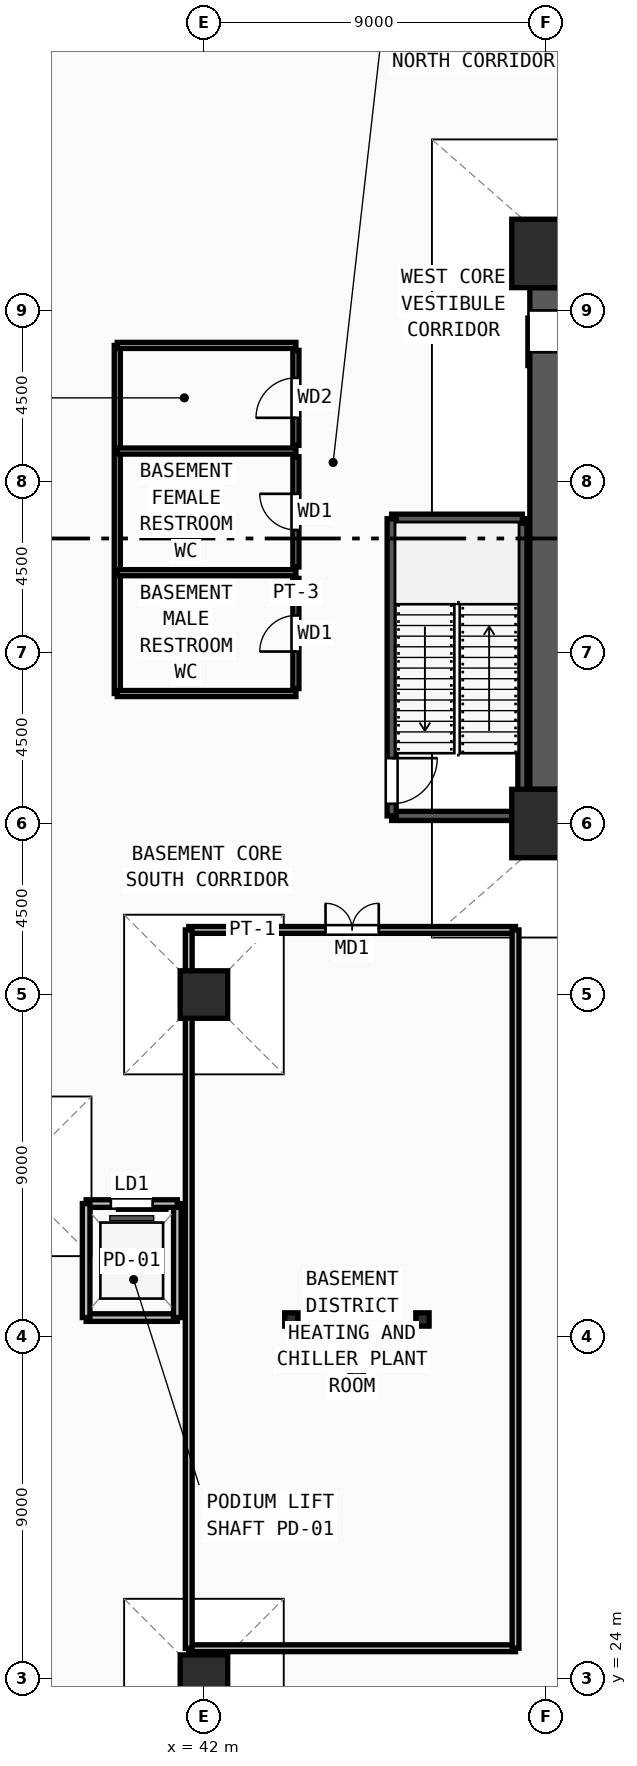
"""IFC4 building model, lengths in metres.
Left out: names, types, materials, properties, quantities, classifications, styles, units other than length and angle.
Written with IfcOpenShell. Run it as: python <this file> out.ifc"""

import sys

from ifc_helpers import new_model, si_unit, direction, frame, frame_2d, origin, origin_2d, place, context, subcontext, project, spatial, rectangle, i_section, extrude, source, transform, mapped, element, fill, save


model = new_model("IFC4")
c1 = context("Model", 3, precision=1e-05, world=origin(), true_north=direction((0.0, 1.0)))
c2 = subcontext(c1, "Body", "Model", "MODEL_VIEW")
j1 = project(units=[si_unit("LENGTHUNIT", "METRE"), si_unit("PLANEANGLEUNIT", "RADIAN")], contexts=[c1])
p1 = place(None, origin())
s1 = spatial("IfcSite", under=j1, at=p1, CompositionType="ELEMENT")
p2 = place(p1, origin())
s2 = spatial("IfcBuilding", under=s1, at=p2, CompositionType="ELEMENT")
p3 = place(p2, frame((0.0, 0.0, -9.6)))
s3 = spatial("IfcBuildingStorey", under=s2, at=p3, CompositionType="ELEMENT", Elevation=-9.6)
m1 = source(origin(), c2, "Body", "SweptSolid", [
    extrude(rectangle(XDim=1.8, YDim=1.8, at=origin_2d()), origin(), (0.0, 0.0, 1.0), 4.8),
])
for number, where, z_axis, x_axis in (
    (1, (51.0, 46.5, 0.0), (0.0, 0.0, 1.0), (1.0, 0.0, 0.0)),
    (2, (51.0, 61.5, 0.0), (0.0, 0.0, 1.0), (1.0, 0.0, 0.0)),
):
    element("IfcColumn", number, at=place(p3, frame(where, z_axis=z_axis, x_axis=x_axis)), inside=s3, PredefinedType="COLUMN", context=c2, shape_type="MappedRepresentation", body=[
        mapped(m1, transform((0.0, 0.0, 0.0), x_axis=(1.0, 0.0, 0.0), y_axis=(0.0, 1.0, 0.0), z_axis=(0.0, 0.0, 1.0), scale=1.0)),
    ])
m2 = source(origin(), c2, "Body", "SweptSolid", [
    extrude(rectangle(XDim=1.25, YDim=1.25, at=origin_2d()), origin(), (0.0, 0.0, 1.0), 4.8),
])
for number, where, z_axis, x_axis in (
    (3, (42.0, 24.0, 0.0), (0.0, 0.0, 1.0), (1.0, 0.0, 0.0)),
    (4, (42.0, 42.0, 0.0), (0.0, 0.0, 1.0), (1.0, 0.0, 0.0)),
):
    element("IfcColumn", number, at=place(p3, frame(where, z_axis=z_axis, x_axis=x_axis)), inside=s3, PredefinedType="COLUMN", context=c2, shape_type="MappedRepresentation", body=[
        mapped(m2, transform((0.0, 0.0, 0.0), x_axis=(1.0, 0.0, 0.0), y_axis=(0.0, 1.0, 0.0), z_axis=(0.0, 0.0, 1.0), scale=1.0)),
    ])
m3 = source(origin(), c2, "Body", "SweptSolid", [
    extrude(i_section(OverallWidth=0.35, OverallDepth=0.35, WebThickness=0.012, FlangeThickness=0.019, at=origin_2d()), origin(), (0.0, 0.0, 1.0), 4.8),
])
for number, where, z_axis, x_axis in (
    (5, (44.3, 33.45, 0.0), (0.0, 0.0, 1.0), (1.0, 0.0, 0.0)),
    (6, (47.75, 33.45, 0.0), (0.0, 0.0, 1.0), (1.0, 0.0, 0.0)),
    (7, (46.02, 32.05, 0.0), (0.0, 0.0, 1.0), (1.0, 0.0, 0.0)),
):
    element("IfcColumn", number, at=place(p3, frame(where, z_axis=z_axis, x_axis=x_axis)), inside=s3, PredefinedType="COLUMN", context=c2, shape_type="MappedRepresentation", body=[
        mapped(m3, transform((0.0, 0.0, 0.0), x_axis=(1.0, 0.0, 0.0), y_axis=(0.0, 1.0, 0.0), z_axis=(0.0, 0.0, 1.0), scale=1.0)),
    ])
p4 = place(p3, frame((51.0, 47.4, 0.0), z_axis=(0.0, 0.0, 1.0), x_axis=(0.0, 1.0, 0.0)))
e8 = element("IfcWall", 8, at=p4, inside=s3, PredefinedType="SHEAR", context=c2, shape_type="SweptSolid", body=[
    extrude(rectangle(XDim=13.2, YDim=0.85, at=frame_2d((6.6, 0.0))), origin(), (0.0, 0.0, 1.0), 4.5),
])
m4 = source(origin(), c2, "Body", "SweptSolid", [
    extrude(rectangle(XDim=1.1, YDim=2.2, at=frame_2d((0.55, 1.1))), frame((0.0, 0.435, 0.0), z_axis=(0.0, -1.0, 0.0), x_axis=(1.0, 0.0, 0.0)), (0.0, 0.0, 1.0), 0.87),
])
p5 = place(p4, frame((11.5, 0.0, 0.0)))
e9 = element("IfcOpeningElement", 9, at=p5, cuts=e8, PredefinedType="OPENING", context=c2, shape_type="MappedRepresentation", body=[
    mapped(m4, transform((0.0, 0.0, 0.0), x_axis=(1.0, 0.0, 0.0), y_axis=(0.0, 1.0, 0.0), z_axis=(0.0, 0.0, 1.0), scale=1.0)),
])
p6 = place(p3, frame((46.94, 46.7, 0.0), z_axis=(0.0, 0.0, 1.0), x_axis=(1.0, 0.0, 0.0)))
e10 = element("IfcWall", 10, at=p6, inside=s3, PredefinedType="SOLIDWALL", context=c2, shape_type="SweptSolid", body=[
    extrude(rectangle(XDim=3.44, YDim=0.24, at=frame_2d((1.72, 0.0))), origin(), (0.0, 0.0, 1.0), 4.5),
])
p7 = place(p3, frame((50.38, 46.7, 0.0), z_axis=(0.0, 0.0, 1.0), x_axis=(0.0, 1.0, 0.0)))
e11 = element("IfcWall", 11, at=p7, inside=s3, PredefinedType="SOLIDWALL", context=c2, shape_type="SweptSolid", body=[
    extrude(rectangle(XDim=7.82, YDim=0.24, at=frame_2d((3.91, 0.0))), origin(), (0.0, 0.0, 1.0), 4.5),
])
p8 = place(p3, frame((50.38, 54.52, 0.0), z_axis=(0.0, 0.0, 1.0), x_axis=(-1.0, 0.0, 0.0)))
e12 = element("IfcWall", 12, at=p8, inside=s3, PredefinedType="SOLIDWALL", context=c2, shape_type="SweptSolid", body=[
    extrude(rectangle(XDim=3.44, YDim=0.24, at=frame_2d((1.72, 0.0))), origin(), (0.0, 0.0, 1.0), 4.5),
])
p9 = place(p3, frame((46.94, 54.52, 0.0), z_axis=(0.0, 0.0, 1.0), x_axis=(0.0, -1.0, 0.0)))
e13 = element("IfcWall", 13, at=p9, inside=s3, PredefinedType="SOLIDWALL", context=c2, shape_type="SweptSolid", body=[
    extrude(rectangle(XDim=7.82, YDim=0.24, at=frame_2d((3.91, 0.0))), origin(), (0.0, 0.0, 1.0), 4.5),
])
m5 = source(origin(), c2, "Body", "SweptSolid", [
    extrude(rectangle(XDim=1.2, YDim=2.2, at=frame_2d((0.6, 1.1))), frame((0.0, 0.13, 0.0), z_axis=(0.0, -1.0, 0.0), x_axis=(1.0, 0.0, 0.0)), (0.0, 0.0, 1.0), 0.26),
])
p10 = place(p9, frame((6.3, 0.0, 0.0)))
e14 = element("IfcOpeningElement", 14, at=p10, cuts=e13, PredefinedType="OPENING", context=c2, shape_type="MappedRepresentation", body=[
    mapped(m5, transform((0.0, 0.0, 0.0), x_axis=(1.0, 0.0, 0.0), y_axis=(0.0, 1.0, 0.0), z_axis=(0.0, 0.0, 1.0), scale=1.0)),
])
p11 = place(p3, frame((38.9, 33.5, 0.0), z_axis=(0.0, 0.0, 1.0), x_axis=(1.0, 0.0, 0.0)))
e15 = element("IfcWall", 15, at=p11, inside=s3, PredefinedType="SOLIDWALL", context=c2, shape_type="SweptSolid", body=[
    extrude(rectangle(XDim=2.4, YDim=0.2, at=frame_2d((1.2, 0.0))), origin(), (0.0, 0.0, 1.0), 4.5),
])
p12 = place(p3, frame((41.3, 33.5, 0.0), z_axis=(0.0, 0.0, 1.0), x_axis=(0.0, 1.0, 0.0)))
e16 = element("IfcWall", 16, at=p12, inside=s3, PredefinedType="SOLIDWALL", context=c2, shape_type="SweptSolid", body=[
    extrude(rectangle(XDim=3.0, YDim=0.2, at=frame_2d((1.5, 0.0))), origin(), (0.0, 0.0, 1.0), 4.5),
])
p13 = place(p3, frame((41.3, 36.5, 0.0), z_axis=(0.0, 0.0, 1.0), x_axis=(-1.0, 0.0, 0.0)))
e17 = element("IfcWall", 17, at=p13, inside=s3, PredefinedType="SOLIDWALL", context=c2, shape_type="SweptSolid", body=[
    extrude(rectangle(XDim=2.4, YDim=0.2, at=frame_2d((1.2, 0.0))), origin(), (0.0, 0.0, 1.0), 4.5),
])
m6 = source(origin(), c2, "Body", "SweptSolid", [
    extrude(rectangle(XDim=1.1, YDim=2.2, at=frame_2d((0.55, 1.1))), frame((0.0, 0.11, 0.0), z_axis=(0.0, -1.0, 0.0), x_axis=(1.0, 0.0, 0.0)), (0.0, 0.0, 1.0), 0.22),
])
p14 = place(p13, frame((0.65, 0.0, 0.0)))
e18 = element("IfcOpeningElement", 18, at=p14, cuts=e17, PredefinedType="OPENING", context=c2, shape_type="MappedRepresentation", body=[
    mapped(m6, transform((0.0, 0.0, 0.0), x_axis=(1.0, 0.0, 0.0), y_axis=(0.0, 1.0, 0.0), z_axis=(0.0, 0.0, 1.0), scale=1.0)),
])
p15 = place(p3, frame((38.9, 36.5, 0.0), z_axis=(0.0, 0.0, 1.0), x_axis=(0.0, -1.0, 0.0)))
e19 = element("IfcWall", 19, at=p15, inside=s3, PredefinedType="SOLIDWALL", context=c2, shape_type="SweptSolid", body=[
    extrude(rectangle(XDim=3.0, YDim=0.2, at=frame_2d((1.5, 0.0))), origin(), (0.0, 0.0, 1.0), 4.5),
])
p16 = place(p3, frame((44.42, 50.05, 0.0), z_axis=(0.0, 0.0, 1.0), x_axis=(0.0, 1.0, 0.0)))
e20 = element("IfcWall", 20, at=p16, inside=s3, PredefinedType="PARTITIONING", context=c2, shape_type="SweptSolid", body=[
    extrude(rectangle(XDim=2.9, YDim=0.16, at=frame_2d((1.45, 0.0))), origin(), (0.0, 0.0, 1.0), 4.5),
])
m7 = source(origin(), c2, "Body", "SweptSolid", [
    extrude(rectangle(XDim=0.95, YDim=2.15, at=frame_2d((0.475, 1.075))), frame((0.0, 0.09, 0.0), z_axis=(0.0, -1.0, 0.0), x_axis=(1.0, 0.0, 0.0)), (0.0, 0.0, 1.0), 0.18),
])
p17 = place(p16, frame((0.975, 0.0, 0.0)))
e21 = element("IfcOpeningElement", 21, at=p17, cuts=e20, PredefinedType="OPENING", context=c2, shape_type="MappedRepresentation", body=[
    mapped(m7, transform((0.0, 0.0, 0.0), x_axis=(1.0, 0.0, 0.0), y_axis=(0.0, 1.0, 0.0), z_axis=(0.0, 0.0, 1.0), scale=1.0)),
])
p18 = place(p3, frame((44.42, 53.25, 0.0), z_axis=(0.0, 0.0, 1.0), x_axis=(0.0, 1.0, 0.0)))
e22 = element("IfcWall", 22, at=p18, inside=s3, PredefinedType="PARTITIONING", context=c2, shape_type="SweptSolid", body=[
    extrude(rectangle(XDim=2.9, YDim=0.16, at=frame_2d((1.45, 0.0))), origin(), (0.0, 0.0, 1.0), 4.5),
])
p19 = place(p18, frame((0.975, 0.0, 0.0)))
e23 = element("IfcOpeningElement", 23, at=p19, cuts=e22, PredefinedType="OPENING", context=c2, shape_type="MappedRepresentation", body=[
    mapped(m7, transform((0.0, 0.0, 0.0), x_axis=(1.0, 0.0, 0.0), y_axis=(0.0, 1.0, 0.0), z_axis=(0.0, 0.0, 1.0), scale=1.0)),
])
p20 = place(p3, frame((44.42, 56.45, 0.0), z_axis=(0.0, 0.0, 1.0), x_axis=(0.0, 1.0, 0.0)))
e24 = element("IfcWall", 24, at=p20, inside=s3, PredefinedType="PARTITIONING", context=c2, shape_type="SweptSolid", body=[
    extrude(rectangle(XDim=2.5, YDim=0.16, at=frame_2d((1.25, 0.0))), origin(), (0.0, 0.0, 1.0), 4.5),
])
m8 = source(origin(), c2, "Body", "SweptSolid", [
    extrude(rectangle(XDim=1.05, YDim=2.15, at=frame_2d((0.525, 1.075))), frame((0.0, 0.09, 0.0), z_axis=(0.0, -1.0, 0.0), x_axis=(1.0, 0.0, 0.0)), (0.0, 0.0, 1.0), 0.18),
])
p21 = place(p20, frame((0.725, 0.0, 0.0)))
e25 = element("IfcOpeningElement", 25, at=p21, cuts=e24, PredefinedType="OPENING", context=c2, shape_type="MappedRepresentation", body=[
    mapped(m8, transform((0.0, 0.0, 0.0), x_axis=(1.0, 0.0, 0.0), y_axis=(0.0, 1.0, 0.0), z_axis=(0.0, 0.0, 1.0), scale=1.0)),
])
p22 = place(p3, frame((41.6, 43.7, 0.0), z_axis=(0.0, 0.0, 1.0), x_axis=(1.0, 0.0, 0.0)))
e26 = element("IfcWall", 26, at=p22, inside=s3, PredefinedType="PARTITIONING", context=c2, shape_type="SweptSolid", body=[
    extrude(rectangle(XDim=8.6, YDim=0.18, at=frame_2d((4.3, 0.0))), origin(), (0.0, 0.0, 1.0), 4.5),
])
m9 = source(origin(), c2, "Body", "SweptSolid", [
    extrude(rectangle(XDim=1.4, YDim=2.25, at=frame_2d((0.7, 1.125))), frame((0.0, 0.1, 0.0), z_axis=(0.0, -1.0, 0.0), x_axis=(1.0, 0.0, 0.0)), (0.0, 0.0, 1.0), 0.2),
])
p23 = place(p22, frame((3.6, 0.0, 0.0)))
e27 = element("IfcOpeningElement", 27, at=p23, cuts=e26, PredefinedType="OPENING", context=c2, shape_type="MappedRepresentation", body=[
    mapped(m9, transform((0.0, 0.0, 0.0), x_axis=(1.0, 0.0, 0.0), y_axis=(0.0, 1.0, 0.0), z_axis=(0.0, 0.0, 1.0), scale=1.0)),
])
p24 = place(p3, frame((39.72, 49.92, 0.0), z_axis=(0.0, 0.0, 1.0), x_axis=(0.0, 1.0, 0.0)))
e28 = element("IfcWall", 28, at=p24, inside=s3, PredefinedType="PARTITIONING", context=c2, shape_type="SweptSolid", body=[
    extrude(rectangle(XDim=9.16, YDim=0.16, at=frame_2d((4.58, 0.0))), origin(), (0.0, 0.0, 1.0), 4.5),
])
for number, where, z_axis, x_axis in (
    (29, (39.72, 49.92, 0.0), (0.0, 0.0, 1.0), (1.0, 0.0, 0.0)),
    (30, (39.72, 53.1, 0.0), (0.0, 0.0, 1.0), (1.0, 0.0, 0.0)),
    (31, (39.72, 56.3, 0.0), (0.0, 0.0, 1.0), (1.0, 0.0, 0.0)),
    (32, (39.72, 59.08, 0.0), (0.0, 0.0, 1.0), (1.0, 0.0, 0.0)),
):
    element("IfcWall", number, at=place(p3, frame(where, z_axis=z_axis, x_axis=x_axis)), inside=s3, PredefinedType="PARTITIONING", context=c2, shape_type="SweptSolid", body=[
        extrude(rectangle(XDim=4.7, YDim=0.16, at=frame_2d((2.35, 0.0))), origin(), (0.0, 0.0, 1.0), 4.5),
    ])
p25 = place(p3, frame((41.6, 24.8, 0.0), z_axis=(0.0, 0.0, 1.0), x_axis=(1.0, 0.0, 0.0)))
e33 = element("IfcWall", 33, at=p25, inside=s3, PredefinedType="PARTITIONING", context=c2, shape_type="SweptSolid", body=[
    extrude(rectangle(XDim=8.6, YDim=0.18, at=frame_2d((4.3, 0.0))), origin(), (0.0, 0.0, 1.0), 4.5),
])
for number, where, z_axis, x_axis in (
    (34, (41.6, 24.8, 0.0), (0.0, 0.0, 1.0), (0.0, 1.0, 0.0)),
    (35, (50.2, 24.8, 0.0), (0.0, 0.0, 1.0), (0.0, 1.0, 0.0)),
):
    element("IfcWall", number, at=place(p3, frame(where, z_axis=z_axis, x_axis=x_axis)), inside=s3, PredefinedType="PARTITIONING", context=c2, shape_type="SweptSolid", body=[
        extrude(rectangle(XDim=18.9, YDim=0.18, at=frame_2d((9.45, 0.0))), origin(), (0.0, 0.0, 1.0), 4.5),
    ])
m10 = source(origin(), c2, "Body", "SweptSolid", [
    extrude(rectangle(XDim=1.2, YDim=2.2, at=frame_2d((0.6, 1.1))), frame((0.0, 0.025, 0.0), z_axis=(0.0, -1.0, 0.0), x_axis=(1.0, 0.0, 0.0)), (0.0, 0.0, 1.0), 0.05),
])
p26 = place(p10, origin())
e36 = element("IfcDoor", 36, at=p26, inside=s3, OperationType="SINGLE_SWING_LEFT", PredefinedType="DOOR", context=c2, shape_type="MappedRepresentation", body=[
    mapped(m10, transform((0.0, 0.0, 0.0), x_axis=(1.0, 0.0, 0.0), y_axis=(0.0, 1.0, 0.0), z_axis=(0.0, 0.0, 1.0), scale=1.0)),
])
fill(e14, e36)
m11 = source(origin(), c2, "Body", "SweptSolid", [
    extrude(rectangle(XDim=1.1, YDim=2.2, at=frame_2d((0.55, 1.1))), frame((0.0, 0.025, 0.0), z_axis=(0.0, -1.0, 0.0), x_axis=(1.0, 0.0, 0.0)), (0.0, 0.0, 1.0), 0.05),
])
p27 = place(p5, origin())
e37 = element("IfcDoor", 37, at=p27, inside=s3, OperationType="SLIDING_TO_LEFT", PredefinedType="DOOR", context=c2, shape_type="MappedRepresentation", body=[
    mapped(m11, transform((0.0, 0.0, 0.0), x_axis=(1.0, 0.0, 0.0), y_axis=(0.0, 1.0, 0.0), z_axis=(0.0, 0.0, 1.0), scale=1.0)),
])
fill(e9, e37)
p28 = place(p14, origin())
e38 = element("IfcDoor", 38, at=p28, inside=s3, OperationType="SLIDING_TO_LEFT", PredefinedType="DOOR", context=c2, shape_type="MappedRepresentation", body=[
    mapped(m11, transform((0.0, 0.0, 0.0), x_axis=(1.0, 0.0, 0.0), y_axis=(0.0, 1.0, 0.0), z_axis=(0.0, 0.0, 1.0), scale=1.0)),
])
fill(e18, e38)
m12 = source(origin(), c2, "Body", "SweptSolid", [
    extrude(rectangle(XDim=0.95, YDim=2.15, at=frame_2d((0.475, 1.075))), frame((0.0, 0.025, 0.0), z_axis=(0.0, -1.0, 0.0), x_axis=(1.0, 0.0, 0.0)), (0.0, 0.0, 1.0), 0.05),
])
p29 = place(p17, origin())
e39 = element("IfcDoor", 39, at=p29, inside=s3, OperationType="SINGLE_SWING_LEFT", PredefinedType="DOOR", context=c2, shape_type="MappedRepresentation", body=[
    mapped(m12, transform((0.0, 0.0, 0.0), x_axis=(1.0, 0.0, 0.0), y_axis=(0.0, 1.0, 0.0), z_axis=(0.0, 0.0, 1.0), scale=1.0)),
])
fill(e21, e39)
p30 = place(p19, origin())
e40 = element("IfcDoor", 40, at=p30, inside=s3, OperationType="SINGLE_SWING_RIGHT", PredefinedType="DOOR", context=c2, shape_type="MappedRepresentation", body=[
    mapped(m12, transform((0.0, 0.0, 0.0), x_axis=(1.0, 0.0, 0.0), y_axis=(0.0, 1.0, 0.0), z_axis=(0.0, 0.0, 1.0), scale=1.0)),
])
fill(e23, e40)
m13 = source(origin(), c2, "Body", "SweptSolid", [
    extrude(rectangle(XDim=1.05, YDim=2.15, at=frame_2d((0.525, 1.075))), frame((0.0, 0.025, 0.0), z_axis=(0.0, -1.0, 0.0), x_axis=(1.0, 0.0, 0.0)), (0.0, 0.0, 1.0), 0.05),
])
p31 = place(p21, origin())
e41 = element("IfcDoor", 41, at=p31, inside=s3, OperationType="SINGLE_SWING_LEFT", PredefinedType="DOOR", context=c2, shape_type="MappedRepresentation", body=[
    mapped(m13, transform((0.0, 0.0, 0.0), x_axis=(1.0, 0.0, 0.0), y_axis=(0.0, 1.0, 0.0), z_axis=(0.0, 0.0, 1.0), scale=1.0)),
])
fill(e25, e41)
m14 = source(origin(), c2, "Body", "SweptSolid", [
    extrude(rectangle(XDim=1.4, YDim=2.25, at=frame_2d((0.7, 1.125))), frame((0.0, 0.025, 0.0), z_axis=(0.0, -1.0, 0.0), x_axis=(1.0, 0.0, 0.0)), (0.0, 0.0, 1.0), 0.05),
])
p32 = place(p23, origin())
e42 = element("IfcDoor", 42, at=p32, inside=s3, OperationType="DOUBLE_DOOR_SINGLE_SWING", PredefinedType="DOOR", context=c2, shape_type="MappedRepresentation", body=[
    mapped(m14, transform((0.0, 0.0, 0.0), x_axis=(1.0, 0.0, 0.0), y_axis=(0.0, 1.0, 0.0), z_axis=(0.0, 0.0, 1.0), scale=1.0)),
])
fill(e27, e42)
save(model, sys.argv[1])
